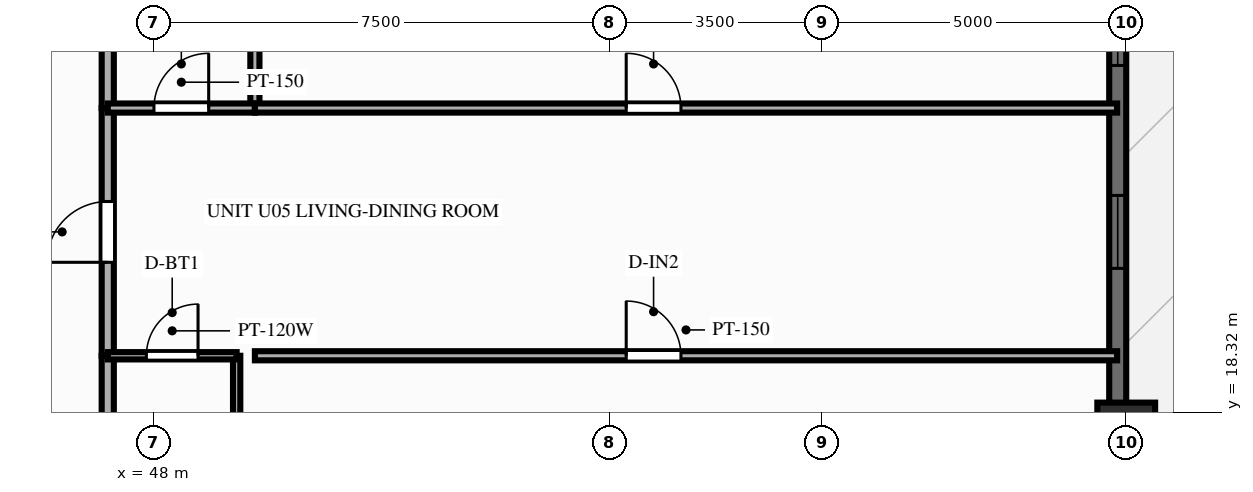
"""IFC4 building model, lengths in metres.
Left out: names, types, materials, properties, quantities, classifications, styles, units other than length and angle.
Written with IfcOpenShell. Run it as: python <this file> out.ifc"""

import sys

from ifc_helpers import new_model, si_unit, direction, frame, frame_2d, origin, origin_2d, place, context, subcontext, project, spatial, rectangle, extrude, source, transform, mapped, element, fill, save


model = new_model("IFC4")
c1 = context("Model", 3, precision=1e-05, world=origin(), true_north=direction((0.0, 1.0)))
c2 = subcontext(c1, "Body", "Model", "MODEL_VIEW")
j1 = project(units=[si_unit("LENGTHUNIT", "METRE"), si_unit("PLANEANGLEUNIT", "RADIAN")], contexts=[c1])
p1 = place(None, origin())
s1 = spatial("IfcSite", under=j1, at=p1, CompositionType="ELEMENT")
p2 = place(p1, origin())
s2 = spatial("IfcBuilding", under=s1, at=p2, CompositionType="ELEMENT")
p3 = place(p2, frame((0.0, 0.0, 101.85)))
s3 = spatial("IfcBuildingStorey", under=s2, at=p3, CompositionType="ELEMENT", Elevation=101.85)
m1 = source(origin(), c2, "Body", "SweptSolid", [
    extrude(rectangle(XDim=0.95, YDim=0.95, at=origin_2d()), origin(), (0.0, 0.0, 1.0), 3.0),
])
p4 = place(p3, frame((64.0, 18.0, 0.0), z_axis=(0.0, 0.0, 1.0), x_axis=(1.0, 0.0, 0.0)))
e1 = element("IfcColumn", 1, at=p4, inside=s3, PredefinedType="COLUMN", context=c2, shape_type="MappedRepresentation", body=[
    mapped(m1, transform((0.0, 0.0, 0.0), scale=1.0)),
])
p5 = place(p3, frame((63.86, 7.2, 0.0), z_axis=(0.0, 0.0, 1.0), x_axis=(0.0, 1.0, 0.0)))
e2 = element("IfcWall", 2, at=p5, inside=s3, PredefinedType="SOLIDWALL", context=c2, shape_type="SweptSolid", body=[
    extrude(rectangle(XDim=39.6, YDim=0.28, at=frame_2d((19.8, 0.0))), origin(), (0.0, 0.0, 1.0), 2.28),
])
p6 = place(p5, frame((0.945, 0.0, 0.25)))
e3 = element("IfcOpeningElement", 3, at=p6, cuts=e2, PredefinedType="OPENING", context=c2, shape_type="SweptSolid", body=[
    extrude(rectangle(XDim=1.2, YDim=1.5, at=frame_2d((0.6, 0.75))), frame((0.0, 0.152, 0.0), z_axis=(0.0, -1.0, 0.0), x_axis=(1.0, 0.0, 0.0)), (0.0, 0.0, 1.0), 0.304),
])
p7 = place(p5, frame((4.213, 0.0, 0.25)))
e4 = element("IfcOpeningElement", 4, at=p7, cuts=e2, PredefinedType="OPENING", context=c2, shape_type="SweptSolid", body=[
    extrude(rectangle(XDim=1.2, YDim=1.5, at=frame_2d((0.6, 0.75))), frame((0.0, 0.152, 0.0), z_axis=(0.0, -1.0, 0.0), x_axis=(1.0, 0.0, 0.0)), (0.0, 0.0, 1.0), 0.304),
])
p8 = place(p5, frame((7.55, 0.0, 0.25)))
e5 = element("IfcOpeningElement", 5, at=p8, cuts=e2, PredefinedType="OPENING", context=c2, shape_type="SweptSolid", body=[
    extrude(rectangle(XDim=1.2, YDim=1.5, at=frame_2d((0.6, 0.75))), frame((0.0, 0.152, 0.0), z_axis=(0.0, -1.0, 0.0), x_axis=(1.0, 0.0, 0.0)), (0.0, 0.0, 1.0), 0.304),
])
p9 = place(p5, frame((13.483, 0.0, 0.25)))
e6 = element("IfcOpeningElement", 6, at=p9, cuts=e2, PredefinedType="OPENING", context=c2, shape_type="SweptSolid", body=[
    extrude(rectangle(XDim=1.2, YDim=1.5, at=frame_2d((0.6, 0.75))), frame((0.0, 0.152, 0.0), z_axis=(0.0, -1.0, 0.0), x_axis=(1.0, 0.0, 0.0)), (0.0, 0.0, 1.0), 0.304),
])
p10 = place(p5, frame((16.82, 0.0, 0.25)))
e7 = element("IfcOpeningElement", 7, at=p10, cuts=e2, PredefinedType="OPENING", context=c2, shape_type="SweptSolid", body=[
    extrude(rectangle(XDim=1.2, YDim=1.5, at=frame_2d((0.6, 0.75))), frame((0.0, 0.152, 0.0), z_axis=(0.0, -1.0, 0.0), x_axis=(1.0, 0.0, 0.0)), (0.0, 0.0, 1.0), 0.304),
])
p11 = place(p5, frame((19.2, 0.0, 0.25)))
e8 = element("IfcOpeningElement", 8, at=p11, cuts=e2, PredefinedType="OPENING", context=c2, shape_type="SweptSolid", body=[
    extrude(rectangle(XDim=1.2, YDim=1.5, at=frame_2d((0.6, 0.75))), frame((0.0, 0.152, 0.0), z_axis=(0.0, -1.0, 0.0), x_axis=(1.0, 0.0, 0.0)), (0.0, 0.0, 1.0), 0.304),
])
p12 = place(p5, frame((21.578, 0.0, 0.25)))
e9 = element("IfcOpeningElement", 9, at=p12, cuts=e2, PredefinedType="OPENING", context=c2, shape_type="SweptSolid", body=[
    extrude(rectangle(XDim=1.2, YDim=1.5, at=frame_2d((0.6, 0.75))), frame((0.0, 0.152, 0.0), z_axis=(0.0, -1.0, 0.0), x_axis=(1.0, 0.0, 0.0)), (0.0, 0.0, 1.0), 0.304),
])
p13 = place(p5, frame((26.313, 0.0, 0.0), z_axis=(0.0, 0.0, 1.0), x_axis=(-1.0, 0.0, 0.0)))
e10 = element("IfcOpeningElement", 10, at=p13, cuts=e2, PredefinedType="OPENING", context=c2, shape_type="SweptSolid", body=[
    extrude(rectangle(XDim=1.6, YDim=2.15, at=frame_2d((0.8, 1.075))), frame((0.0, 0.152, 0.0), z_axis=(0.0, -1.0, 0.0), x_axis=(1.0, 0.0, 0.0)), (0.0, 0.0, 1.0), 0.304),
])
p14 = place(p5, frame((29.305, 0.0, 0.25)))
e11 = element("IfcOpeningElement", 11, at=p14, cuts=e2, PredefinedType="OPENING", context=c2, shape_type="SweptSolid", body=[
    extrude(rectangle(XDim=0.7, YDim=1.5, at=frame_2d((0.35, 0.75))), frame((0.0, 0.152, 0.0), z_axis=(0.0, -1.0, 0.0), x_axis=(1.0, 0.0, 0.0)), (0.0, 0.0, 1.0), 0.304),
])
p15 = place(p5, frame((30.848, 0.0, 0.25)))
e12 = element("IfcOpeningElement", 12, at=p15, cuts=e2, PredefinedType="OPENING", context=c2, shape_type="SweptSolid", body=[
    extrude(rectangle(XDim=1.2, YDim=1.5, at=frame_2d((0.6, 0.75))), frame((0.0, 0.152, 0.0), z_axis=(0.0, -1.0, 0.0), x_axis=(1.0, 0.0, 0.0)), (0.0, 0.0, 1.0), 0.304),
])
p16 = place(p5, frame((34.183, 0.0, 0.25)))
e13 = element("IfcOpeningElement", 13, at=p16, cuts=e2, PredefinedType="OPENING", context=c2, shape_type="SweptSolid", body=[
    extrude(rectangle(XDim=1.2, YDim=1.5, at=frame_2d((0.6, 0.75))), frame((0.0, 0.152, 0.0), z_axis=(0.0, -1.0, 0.0), x_axis=(1.0, 0.0, 0.0)), (0.0, 0.0, 1.0), 0.304),
])
p17 = place(p5, frame((37.452, 0.0, 0.25)))
e14 = element("IfcOpeningElement", 14, at=p17, cuts=e2, PredefinedType="OPENING", context=c2, shape_type="SweptSolid", body=[
    extrude(rectangle(XDim=1.2, YDim=1.5, at=frame_2d((0.6, 0.75))), frame((0.0, 0.152, 0.0), z_axis=(0.0, -1.0, 0.0), x_axis=(1.0, 0.0, 0.0)), (0.0, 0.0, 1.0), 0.304),
])
p18 = place(p3, frame((47.25, 16.65, 0.0), z_axis=(0.0, 0.0, 1.0), x_axis=(0.0, 1.0, 0.0)))
e15 = element("IfcWall", 15, at=p18, inside=s3, PredefinedType="PARTITIONING", context=c2, shape_type="SweptSolid", body=[
    extrude(rectangle(XDim=2.596, YDim=0.2, at=frame_2d((1.298, 0.0))), origin(), (0.0, 0.0, 1.0), 2.79),
])
p19 = place(p3, frame((47.25, 19.246, 0.0), z_axis=(0.0, 0.0, 1.0), x_axis=(0.0, 1.0, 0.0)))
e16 = element("IfcWall", 16, at=p19, inside=s3, PredefinedType="PARTITIONING", context=c2, shape_type="SweptSolid", body=[
    extrude(rectangle(XDim=4.074, YDim=0.2, at=frame_2d((2.037, 0.0))), origin(), (0.0, 0.0, 1.0), 2.79),
])
p20 = place(p19, frame((1.537, 0.0, 0.0)))
e17 = element("IfcOpeningElement", 17, at=p20, cuts=e16, PredefinedType="OPENING", context=c2, shape_type="SweptSolid", body=[
    extrude(rectangle(XDim=1.0, YDim=2.15, at=frame_2d((0.5, 1.075))), frame((0.0, 0.112, 0.0), z_axis=(0.0, -1.0, 0.0), x_axis=(1.0, 0.0, 0.0)), (0.0, 0.0, 1.0), 0.224),
])
p21 = place(p3, frame((47.25, 23.32, 0.0), z_axis=(0.0, 0.0, 1.0), x_axis=(0.0, 1.0, 0.0)))
e18 = element("IfcWall", 18, at=p21, inside=s3, PredefinedType="PARTITIONING", context=c2, shape_type="SweptSolid", body=[
    extrude(rectangle(XDim=2.6, YDim=0.2, at=frame_2d((1.3, 0.0))), origin(), (0.0, 0.0, 1.0), 2.79),
])
p22 = place(p3, frame((49.37, 16.65, 0.0), z_axis=(0.0, 0.0, 1.0), x_axis=(0.0, 1.0, 0.0)))
e19 = element("IfcWall", 19, at=p22, inside=s3, PredefinedType="PARTITIONING", context=c2, shape_type="SweptSolid", body=[
    extrude(rectangle(XDim=2.596, YDim=0.12, at=frame_2d((1.298, 0.0))), origin(), (0.0, 0.0, 1.0), 2.79),
])
p23 = place(p3, frame((49.67, 23.32, 0.0), z_axis=(0.0, 0.0, 1.0), x_axis=(0.0, 1.0, 0.0)))
e20 = element("IfcWall", 20, at=p23, inside=s3, PredefinedType="PARTITIONING", context=c2, shape_type="SweptSolid", body=[
    extrude(rectangle(XDim=2.6, YDim=0.15, at=frame_2d((1.3, 0.0))), origin(), (0.0, 0.0, 1.0), 2.79),
])
p24 = place(p3, frame((47.25, 19.246, 0.0), z_axis=(0.0, 0.0, 1.0), x_axis=(1.0, 0.0, 0.0)))
e21 = element("IfcWall", 21, at=p24, inside=s3, PredefinedType="PARTITIONING", context=c2, shape_type="SweptSolid", body=[
    extrude(rectangle(XDim=2.12, YDim=0.12, at=frame_2d((1.06, 0.0))), origin(), (0.0, 0.0, 1.0), 2.79),
])
p25 = place(p24, frame((0.635, 0.0, 0.0)))
e22 = element("IfcOpeningElement", 22, at=p25, cuts=e21, PredefinedType="OPENING", context=c2, shape_type="SweptSolid", body=[
    extrude(rectangle(XDim=0.85, YDim=2.05, at=frame_2d((0.425, 1.025))), frame((0.0, 0.072, 0.0), z_axis=(0.0, -1.0, 0.0), x_axis=(1.0, 0.0, 0.0)), (0.0, 0.0, 1.0), 0.144),
])
p26 = place(p3, frame((49.67, 19.246, 0.0), z_axis=(0.0, 0.0, 1.0), x_axis=(1.0, 0.0, 0.0)))
e23 = element("IfcWall", 23, at=p26, inside=s3, PredefinedType="PARTITIONING", context=c2, shape_type="SweptSolid", body=[
    extrude(rectangle(XDim=14.18, YDim=0.15, at=frame_2d((7.09, 0.0))), origin(), (0.0, 0.0, 1.0), 2.79),
])
p27 = place(p26, frame((6.107, 0.0, 0.0)))
e24 = element("IfcOpeningElement", 24, at=p27, cuts=e23, PredefinedType="OPENING", context=c2, shape_type="SweptSolid", body=[
    extrude(rectangle(XDim=0.9, YDim=2.1, at=frame_2d((0.45, 1.05))), frame((0.0, 0.087, 0.0), z_axis=(0.0, -1.0, 0.0), x_axis=(1.0, 0.0, 0.0)), (0.0, 0.0, 1.0), 0.174),
])
p28 = place(p3, frame((47.25, 23.32, 0.0), z_axis=(0.0, 0.0, 1.0), x_axis=(1.0, 0.0, 0.0)))
e25 = element("IfcWall", 25, at=p28, inside=s3, PredefinedType="PARTITIONING", context=c2, shape_type="SweptSolid", body=[
    extrude(rectangle(XDim=2.42, YDim=0.15, at=frame_2d((1.21, 0.0))), origin(), (0.0, 0.0, 1.0), 2.79),
])
p29 = place(p28, frame((0.76, 0.0, 0.0)))
e26 = element("IfcOpeningElement", 26, at=p29, cuts=e25, PredefinedType="OPENING", context=c2, shape_type="SweptSolid", body=[
    extrude(rectangle(XDim=0.9, YDim=2.1, at=frame_2d((0.45, 1.05))), frame((0.0, 0.087, 0.0), z_axis=(0.0, -1.0, 0.0), x_axis=(1.0, 0.0, 0.0)), (0.0, 0.0, 1.0), 0.174),
])
p30 = place(p3, frame((49.67, 23.32, 0.0), z_axis=(0.0, 0.0, 1.0), x_axis=(1.0, 0.0, 0.0)))
e27 = element("IfcWall", 27, at=p30, inside=s3, PredefinedType="PARTITIONING", context=c2, shape_type="SweptSolid", body=[
    extrude(rectangle(XDim=14.18, YDim=0.15, at=frame_2d((7.09, 0.0))), origin(), (0.0, 0.0, 1.0), 2.79),
])
p31 = place(p30, frame((6.107, 0.0, 0.0)))
e28 = element("IfcOpeningElement", 28, at=p31, cuts=e27, PredefinedType="OPENING", context=c2, shape_type="SweptSolid", body=[
    extrude(rectangle(XDim=0.9, YDim=2.1, at=frame_2d((0.45, 1.05))), frame((0.0, 0.087, 0.0), z_axis=(0.0, -1.0, 0.0), x_axis=(1.0, 0.0, 0.0)), (0.0, 0.0, 1.0), 0.174),
])
m2 = source(origin(), c2, "Body", "SweptSolid", [
    extrude(rectangle(XDim=1.2, YDim=1.5, at=frame_2d((0.6, 0.75))), frame((0.0, 0.03, 0.0), z_axis=(0.0, -1.0, 0.0), x_axis=(1.0, 0.0, 0.0)), (0.0, 0.0, 1.0), 0.06),
])
p32 = place(p9, origin())
e29 = element("IfcWindow", 29, at=p32, inside=s3, PartitioningType="SINGLE_PANEL", PredefinedType="WINDOW", context=c2, shape_type="MappedRepresentation", body=[
    mapped(m2, transform((0.0, 0.0, 0.0), scale=1.0)),
])
fill(e6, e29)
p33 = place(p10, origin())
e30 = element("IfcWindow", 30, at=p33, inside=s3, PartitioningType="SINGLE_PANEL", PredefinedType="WINDOW", context=c2, shape_type="MappedRepresentation", body=[
    mapped(m2, transform((0.0, 0.0, 0.0), scale=1.0)),
])
fill(e7, e30)
m3 = source(origin(), c2, "Body", "SweptSolid", [
    extrude(rectangle(XDim=1.0, YDim=2.15, at=frame_2d((0.5, 1.075))), frame((0.0, 0.025, 0.0), z_axis=(0.0, -1.0, 0.0), x_axis=(1.0, 0.0, 0.0)), (0.0, 0.0, 1.0), 0.05),
])
p34 = place(p20, origin())
e31 = element("IfcDoor", 31, at=p34, inside=s3, OperationType="SINGLE_SWING_LEFT", PredefinedType="DOOR", context=c2, shape_type="MappedRepresentation", body=[
    mapped(m3, transform((0.0, 0.0, 0.0), scale=1.0)),
])
fill(e17, e31)
m4 = source(origin(), c2, "Body", "SweptSolid", [
    extrude(rectangle(XDim=0.85, YDim=2.05, at=frame_2d((0.425, 1.025))), frame((0.0, 0.025, 0.0), z_axis=(0.0, -1.0, 0.0), x_axis=(1.0, 0.0, 0.0)), (0.0, 0.0, 1.0), 0.05),
])
p35 = place(p25, origin())
e32 = element("IfcDoor", 32, at=p35, inside=s3, OperationType="SINGLE_SWING_RIGHT", PredefinedType="DOOR", context=c2, shape_type="MappedRepresentation", body=[
    mapped(m4, transform((0.0, 0.0, 0.0), scale=1.0)),
])
fill(e22, e32)
m5 = source(origin(), c2, "Body", "SweptSolid", [
    extrude(rectangle(XDim=0.9, YDim=2.1, at=frame_2d((0.45, 1.05))), frame((0.0, 0.025, 0.0), z_axis=(0.0, -1.0, 0.0), x_axis=(1.0, 0.0, 0.0)), (0.0, 0.0, 1.0), 0.05),
])
p36 = place(p27, origin())
e33 = element("IfcDoor", 33, at=p36, inside=s3, OperationType="SINGLE_SWING_LEFT", PredefinedType="DOOR", context=c2, shape_type="MappedRepresentation", body=[
    mapped(m5, transform((0.0, 0.0, 0.0), scale=1.0)),
])
fill(e24, e33)
p37 = place(p29, origin())
e34 = element("IfcDoor", 34, at=p37, inside=s3, OperationType="SINGLE_SWING_RIGHT", PredefinedType="DOOR", context=c2, shape_type="MappedRepresentation", body=[
    mapped(m5, transform((0.0, 0.0, 0.0), scale=1.0)),
])
fill(e26, e34)
p38 = place(p31, origin())
e35 = element("IfcDoor", 35, at=p38, inside=s3, OperationType="SINGLE_SWING_LEFT", PredefinedType="DOOR", context=c2, shape_type="MappedRepresentation", body=[
    mapped(m5, transform((0.0, 0.0, 0.0), scale=1.0)),
])
fill(e28, e35)
save(model, sys.argv[1])
